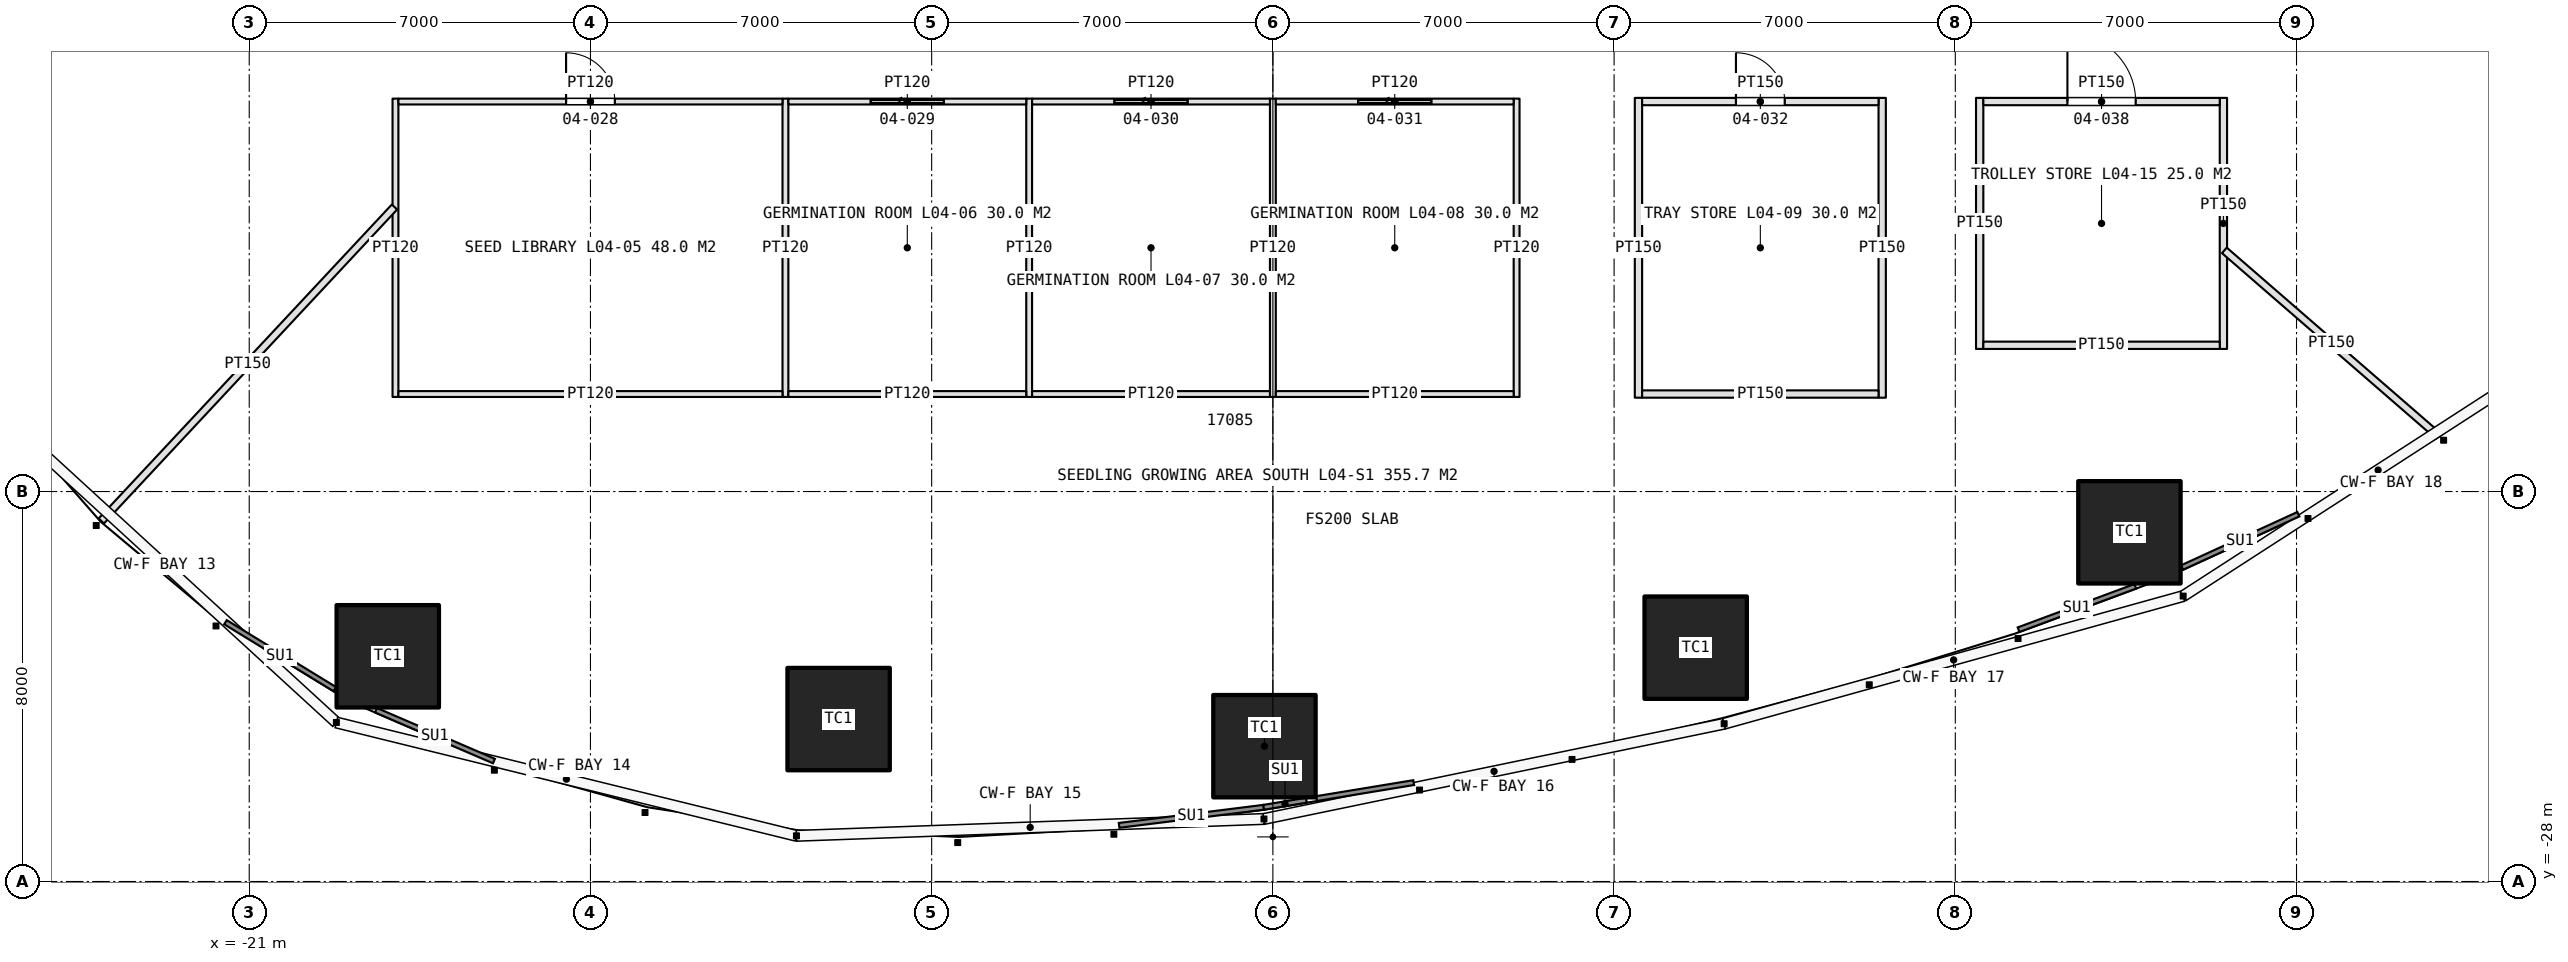
"""IFC4 building model, lengths in metres.
Left out: names, types, materials, properties, quantities, classifications, styles, units other than length and angle.
Written with IfcOpenShell. Run it as: python <this file> out.ifc"""

import sys

from ifc_helpers import new_model, si_unit, direction, frame, frame_2d, origin, origin_2d, place, context, subcontext, project, spatial, rectangle, extrude, element, fill, save


model = new_model("IFC4")
c1 = context("Model", 3, precision=1e-05, world=origin(), true_north=direction((0.0, 1.0)))
c2 = subcontext(c1, "Body", "Model", "MODEL_VIEW")
j1 = project(units=[si_unit("LENGTHUNIT", "METRE"), si_unit("PLANEANGLEUNIT", "RADIAN")], contexts=[c1])
p1 = place(None, origin())
s1 = spatial("IfcSite", under=j1, at=p1, CompositionType="ELEMENT")
p2 = place(p1, origin())
s2 = spatial("IfcBuilding", under=s1, at=p2, CompositionType="ELEMENT")
p3 = place(p2, frame((0.0, 0.0, 20.0)))
s3 = spatial("IfcBuildingStorey", under=s2, at=p3, CompositionType="ELEMENT", Elevation=20.0)
for number, where, z_axis, x_axis in (
    (1, (-18.158, -23.38, 0.0), (0.0, 0.0, 1.0), (1.0, 0.0, 0.0)),
    (2, (-8.909, -24.668, 0.0), (0.0, 0.0, 1.0), (1.0, 0.0, 0.0)),
    (3, (-0.173, -25.224, 0.0), (0.0, 0.0, 1.0), (1.0, 0.0, 0.0)),
    (4, (8.674, -23.203, 0.0), (0.0, 0.0, 1.0), (1.0, 0.0, 0.0)),
    (5, (17.572, -20.837, 0.0), (0.0, 0.0, 1.0), (1.0, 0.0, 0.0)),
):
    element("IfcColumn", number, at=place(p3, frame(where, z_axis=z_axis, x_axis=x_axis)), inside=s3, PredefinedType="COLUMN", context=c2, shape_type="SweptSolid", body=[
        extrude(rectangle(XDim=2.1, YDim=2.1, at=origin_2d()), origin(), (0.0, 0.0, 1.0), 5.0),
    ])
for number, where, z_axis, x_axis in (
    (6, (-18.0, -11.94, 0.0), (0.0, 0.0, 1.0), (0.0, -1.0, 0.0)),
    (7, (-10.0, -11.94, 0.0), (0.0, 0.0, 1.0), (0.0, -1.0, 0.0)),
    (8, (-5.0, -11.94, 0.0), (0.0, 0.0, 1.0), (0.0, -1.0, 0.0)),
    (9, (0.0, -11.94, 0.0), (0.0, 0.0, 1.0), (0.0, -1.0, 0.0)),
    (10, (5.0, -11.94, 0.0), (0.0, 0.0, 1.0), (0.0, -1.0, 0.0)),
):
    element("IfcWall", number, at=place(p3, frame(where, z_axis=z_axis, x_axis=x_axis)), inside=s3, PredefinedType="PARTITIONING", context=c2, shape_type="SweptSolid", body=[
        extrude(rectangle(XDim=6.12, YDim=0.12, at=frame_2d((3.06, 0.0))), origin(), (0.0, 0.0, 1.0), 3.6),
    ])
p4 = place(p3, frame((-17.94, -12.0, 0.0), z_axis=(0.0, 0.0, 1.0), x_axis=(1.0, 0.0, 0.0)))
e11 = element("IfcWall", 11, at=p4, inside=s3, PredefinedType="PARTITIONING", context=c2, shape_type="SweptSolid", body=[
    extrude(rectangle(XDim=7.88, YDim=0.12, at=frame_2d((3.94, 0.0))), origin(), (0.0, 0.0, 1.0), 3.6),
])
p5 = place(p4, frame((3.44, 0.0, 0.0)))
e12 = element("IfcOpeningElement", 12, at=p5, cuts=e11, PredefinedType="OPENING", context=c2, shape_type="SweptSolid", body=[
    extrude(rectangle(XDim=1.0, YDim=2.2, at=frame_2d((0.5, 1.1))), frame((0.0, 0.07, 0.0), z_axis=(0.0, -1.0, 0.0), x_axis=(1.0, 0.0, 0.0)), (0.0, 0.0, 1.0), 0.14),
])
p6 = place(p3, frame((-17.94, -18.0, 0.0), z_axis=(0.0, 0.0, 1.0), x_axis=(1.0, 0.0, 0.0)))
e13 = element("IfcWall", 13, at=p6, inside=s3, PredefinedType="PARTITIONING", context=c2, shape_type="SweptSolid", body=[
    extrude(rectangle(XDim=7.88, YDim=0.12, at=frame_2d((3.94, 0.0))), origin(), (0.0, 0.0, 1.0), 3.6),
])
p7 = place(p3, frame((-9.94, -12.0, 0.0), z_axis=(0.0, 0.0, 1.0), x_axis=(1.0, 0.0, 0.0)))
e14 = element("IfcWall", 14, at=p7, inside=s3, PredefinedType="PARTITIONING", context=c2, shape_type="SweptSolid", body=[
    extrude(rectangle(XDim=4.88, YDim=0.12, at=frame_2d((2.44, 0.0))), origin(), (0.0, 0.0, 1.0), 3.6),
])
p8 = place(p7, frame((1.69, 0.0, 0.0)))
e15 = element("IfcOpeningElement", 15, at=p8, cuts=e14, PredefinedType="OPENING", context=c2, shape_type="SweptSolid", body=[
    extrude(rectangle(XDim=1.5, YDim=2.5, at=frame_2d((0.75, 1.25))), frame((0.0, 0.07, 0.0), z_axis=(0.0, -1.0, 0.0), x_axis=(1.0, 0.0, 0.0)), (0.0, 0.0, 1.0), 0.14),
])
p9 = place(p3, frame((-9.94, -18.0, 0.0), z_axis=(0.0, 0.0, 1.0), x_axis=(1.0, 0.0, 0.0)))
e16 = element("IfcWall", 16, at=p9, inside=s3, PredefinedType="PARTITIONING", context=c2, shape_type="SweptSolid", body=[
    extrude(rectangle(XDim=4.88, YDim=0.12, at=frame_2d((2.44, 0.0))), origin(), (0.0, 0.0, 1.0), 3.6),
])
p10 = place(p3, frame((-4.94, -12.0, 0.0), z_axis=(0.0, 0.0, 1.0), x_axis=(1.0, 0.0, 0.0)))
e17 = element("IfcWall", 17, at=p10, inside=s3, PredefinedType="PARTITIONING", context=c2, shape_type="SweptSolid", body=[
    extrude(rectangle(XDim=4.88, YDim=0.12, at=frame_2d((2.44, 0.0))), origin(), (0.0, 0.0, 1.0), 3.6),
])
p11 = place(p10, frame((1.69, 0.0, 0.0)))
e18 = element("IfcOpeningElement", 18, at=p11, cuts=e17, PredefinedType="OPENING", context=c2, shape_type="SweptSolid", body=[
    extrude(rectangle(XDim=1.5, YDim=2.5, at=frame_2d((0.75, 1.25))), frame((0.0, 0.07, 0.0), z_axis=(0.0, -1.0, 0.0), x_axis=(1.0, 0.0, 0.0)), (0.0, 0.0, 1.0), 0.14),
])
p12 = place(p3, frame((-4.94, -18.0, 0.0), z_axis=(0.0, 0.0, 1.0), x_axis=(1.0, 0.0, 0.0)))
e19 = element("IfcWall", 19, at=p12, inside=s3, PredefinedType="PARTITIONING", context=c2, shape_type="SweptSolid", body=[
    extrude(rectangle(XDim=4.88, YDim=0.12, at=frame_2d((2.44, 0.0))), origin(), (0.0, 0.0, 1.0), 3.6),
])
p13 = place(p3, frame((0.06, -12.0, 0.0), z_axis=(0.0, 0.0, 1.0), x_axis=(1.0, 0.0, 0.0)))
e20 = element("IfcWall", 20, at=p13, inside=s3, PredefinedType="PARTITIONING", context=c2, shape_type="SweptSolid", body=[
    extrude(rectangle(XDim=4.88, YDim=0.12, at=frame_2d((2.44, 0.0))), origin(), (0.0, 0.0, 1.0), 3.6),
])
p14 = place(p13, frame((1.69, 0.0, 0.0)))
e21 = element("IfcOpeningElement", 21, at=p14, cuts=e20, PredefinedType="OPENING", context=c2, shape_type="SweptSolid", body=[
    extrude(rectangle(XDim=1.5, YDim=2.5, at=frame_2d((0.75, 1.25))), frame((0.0, 0.07, 0.0), z_axis=(0.0, -1.0, 0.0), x_axis=(1.0, 0.0, 0.0)), (0.0, 0.0, 1.0), 0.14),
])
p15 = place(p3, frame((0.06, -18.0, 0.0), z_axis=(0.0, 0.0, 1.0), x_axis=(1.0, 0.0, 0.0)))
e22 = element("IfcWall", 22, at=p15, inside=s3, PredefinedType="PARTITIONING", context=c2, shape_type="SweptSolid", body=[
    extrude(rectangle(XDim=4.88, YDim=0.12, at=frame_2d((2.44, 0.0))), origin(), (0.0, 0.0, 1.0), 3.6),
])
for number, where, z_axis, x_axis in (
    (23, (7.5, -11.925, 0.0), (0.0, 0.0, 1.0), (0.0, -1.0, 0.0)),
    (24, (12.5, -11.925, 0.0), (0.0, 0.0, 1.0), (0.0, -1.0, 0.0)),
):
    element("IfcWall", number, at=place(p3, frame(where, z_axis=z_axis, x_axis=x_axis)), inside=s3, PredefinedType="PARTITIONING", context=c2, shape_type="SweptSolid", body=[
        extrude(rectangle(XDim=6.15, YDim=0.15, at=frame_2d((3.075, 0.0))), origin(), (0.0, 0.0, 1.0), 3.6),
    ])
p16 = place(p3, frame((7.575, -12.0, 0.0), z_axis=(0.0, 0.0, 1.0), x_axis=(1.0, 0.0, 0.0)))
e25 = element("IfcWall", 25, at=p16, inside=s3, PredefinedType="PARTITIONING", context=c2, shape_type="SweptSolid", body=[
    extrude(rectangle(XDim=4.85, YDim=0.15, at=frame_2d((2.425, 0.0))), origin(), (0.0, 0.0, 1.0), 3.6),
])
p17 = place(p16, frame((1.925, 0.0, 0.0)))
e26 = element("IfcOpeningElement", 26, at=p17, cuts=e25, PredefinedType="OPENING", context=c2, shape_type="SweptSolid", body=[
    extrude(rectangle(XDim=1.0, YDim=2.2, at=frame_2d((0.5, 1.1))), frame((0.0, 0.085, 0.0), z_axis=(0.0, -1.0, 0.0), x_axis=(1.0, 0.0, 0.0)), (0.0, 0.0, 1.0), 0.17),
])
p18 = place(p3, frame((7.575, -18.0, 0.0), z_axis=(0.0, 0.0, 1.0), x_axis=(1.0, 0.0, 0.0)))
e27 = element("IfcWall", 27, at=p18, inside=s3, PredefinedType="PARTITIONING", context=c2, shape_type="SweptSolid", body=[
    extrude(rectangle(XDim=4.85, YDim=0.15, at=frame_2d((2.425, 0.0))), origin(), (0.0, 0.0, 1.0), 3.6),
])
for number, where, z_axis, x_axis in (
    (28, (14.5, -11.925, 0.0), (0.0, 0.0, 1.0), (0.0, -1.0, 0.0)),
    (29, (19.5, -11.925, 0.0), (0.0, 0.0, 1.0), (0.0, -1.0, 0.0)),
):
    element("IfcWall", number, at=place(p3, frame(where, z_axis=z_axis, x_axis=x_axis)), inside=s3, PredefinedType="PARTITIONING", context=c2, shape_type="SweptSolid", body=[
        extrude(rectangle(XDim=5.15, YDim=0.15, at=frame_2d((2.575, 0.0))), origin(), (0.0, 0.0, 1.0), 3.6),
    ])
p19 = place(p3, frame((14.575, -12.0, 0.0), z_axis=(0.0, 0.0, 1.0), x_axis=(1.0, 0.0, 0.0)))
e30 = element("IfcWall", 30, at=p19, inside=s3, PredefinedType="PARTITIONING", context=c2, shape_type="SweptSolid", body=[
    extrude(rectangle(XDim=4.85, YDim=0.15, at=frame_2d((2.425, 0.0))), origin(), (0.0, 0.0, 1.0), 3.6),
])
p20 = place(p19, frame((1.725, 0.0, 0.0)))
e31 = element("IfcOpeningElement", 31, at=p20, cuts=e30, PredefinedType="OPENING", context=c2, shape_type="SweptSolid", body=[
    extrude(rectangle(XDim=1.4, YDim=2.4, at=frame_2d((0.7, 1.2))), frame((0.0, 0.085, 0.0), z_axis=(0.0, -1.0, 0.0), x_axis=(1.0, 0.0, 0.0)), (0.0, 0.0, 1.0), 0.17),
])
p21 = place(p3, frame((14.575, -17.0, 0.0), z_axis=(0.0, 0.0, 1.0), x_axis=(1.0, 0.0, 0.0)))
e32 = element("IfcWall", 32, at=p21, inside=s3, PredefinedType="PARTITIONING", context=c2, shape_type="SweptSolid", body=[
    extrude(rectangle(XDim=4.85, YDim=0.15, at=frame_2d((2.425, 0.0))), origin(), (0.0, 0.0, 1.0), 3.6),
])
p22 = place(p3, frame((-18.02, -14.163, 0.0), z_axis=(0.0, 0.0, 1.0), x_axis=(-0.682521563847, -0.730865456075, 0.0)))
e33 = element("IfcWall", 33, at=p22, inside=s3, PredefinedType="PARTITIONING", context=c2, shape_type="SweptSolid", body=[
    extrude(rectangle(XDim=8.812, YDim=0.15, at=frame_2d((4.406, 0.0))), origin(), (0.0, 0.0, 1.0), 3.6),
])
p23 = place(p3, frame((19.52, -15.053, 0.0), z_axis=(0.0, 0.0, 1.0), x_axis=(0.755428315431, -0.655231302858, 0.0)))
e34 = element("IfcWall", 34, at=p23, inside=s3, PredefinedType="PARTITIONING", context=c2, shape_type="SweptSolid", body=[
    extrude(rectangle(XDim=5.809, YDim=0.15, at=frame_2d((2.904, 0.0))), origin(), (0.0, 0.0, 1.0), 3.6),
])
p24 = place(p5, origin())
e35 = element("IfcDoor", 35, at=p24, inside=s3, OperationType="SINGLE_SWING_LEFT", PredefinedType="DOOR", context=c2, shape_type="SweptSolid", body=[
    extrude(rectangle(XDim=1.0, YDim=2.2, at=frame_2d((0.5, 1.1))), frame((0.0, 0.025, 0.0), z_axis=(0.0, -1.0, 0.0), x_axis=(1.0, 0.0, 0.0)), (0.0, 0.0, 1.0), 0.05),
])
fill(e12, e35)
p25 = place(p8, origin())
e36 = element("IfcDoor", 36, at=p25, inside=s3, OperationType="SLIDING_TO_LEFT", PredefinedType="DOOR", context=c2, shape_type="SweptSolid", body=[
    extrude(rectangle(XDim=1.5, YDim=2.5, at=frame_2d((0.75, 1.25))), frame((0.0, 0.025, 0.0), z_axis=(0.0, -1.0, 0.0), x_axis=(1.0, 0.0, 0.0)), (0.0, 0.0, 1.0), 0.05),
])
fill(e15, e36)
p26 = place(p11, origin())
e37 = element("IfcDoor", 37, at=p26, inside=s3, OperationType="SLIDING_TO_LEFT", PredefinedType="DOOR", context=c2, shape_type="SweptSolid", body=[
    extrude(rectangle(XDim=1.5, YDim=2.5, at=frame_2d((0.75, 1.25))), frame((0.0, 0.025, 0.0), z_axis=(0.0, -1.0, 0.0), x_axis=(1.0, 0.0, 0.0)), (0.0, 0.0, 1.0), 0.05),
])
fill(e18, e37)
p27 = place(p14, origin())
e38 = element("IfcDoor", 38, at=p27, inside=s3, OperationType="SLIDING_TO_LEFT", PredefinedType="DOOR", context=c2, shape_type="SweptSolid", body=[
    extrude(rectangle(XDim=1.5, YDim=2.5, at=frame_2d((0.75, 1.25))), frame((0.0, 0.025, 0.0), z_axis=(0.0, -1.0, 0.0), x_axis=(1.0, 0.0, 0.0)), (0.0, 0.0, 1.0), 0.05),
])
fill(e21, e38)
p28 = place(p17, origin())
e39 = element("IfcDoor", 39, at=p28, inside=s3, OperationType="SINGLE_SWING_LEFT", PredefinedType="DOOR", context=c2, shape_type="SweptSolid", body=[
    extrude(rectangle(XDim=1.0, YDim=2.2, at=frame_2d((0.5, 1.1))), frame((0.0, 0.025, 0.0), z_axis=(0.0, -1.0, 0.0), x_axis=(1.0, 0.0, 0.0)), (0.0, 0.0, 1.0), 0.05),
])
fill(e26, e39)
p29 = place(p20, origin())
e40 = element("IfcDoor", 40, at=p29, inside=s3, OperationType="DOUBLE_DOOR_DOUBLE_SWING", PredefinedType="DOOR", context=c2, shape_type="SweptSolid", body=[
    extrude(rectangle(XDim=1.4, YDim=2.4, at=frame_2d((0.7, 1.2))), frame((0.0, 0.025, 0.0), z_axis=(0.0, -1.0, 0.0), x_axis=(1.0, 0.0, 0.0)), (0.0, 0.0, 1.0), 0.05),
])
fill(e31, e40)
save(model, sys.argv[1])
